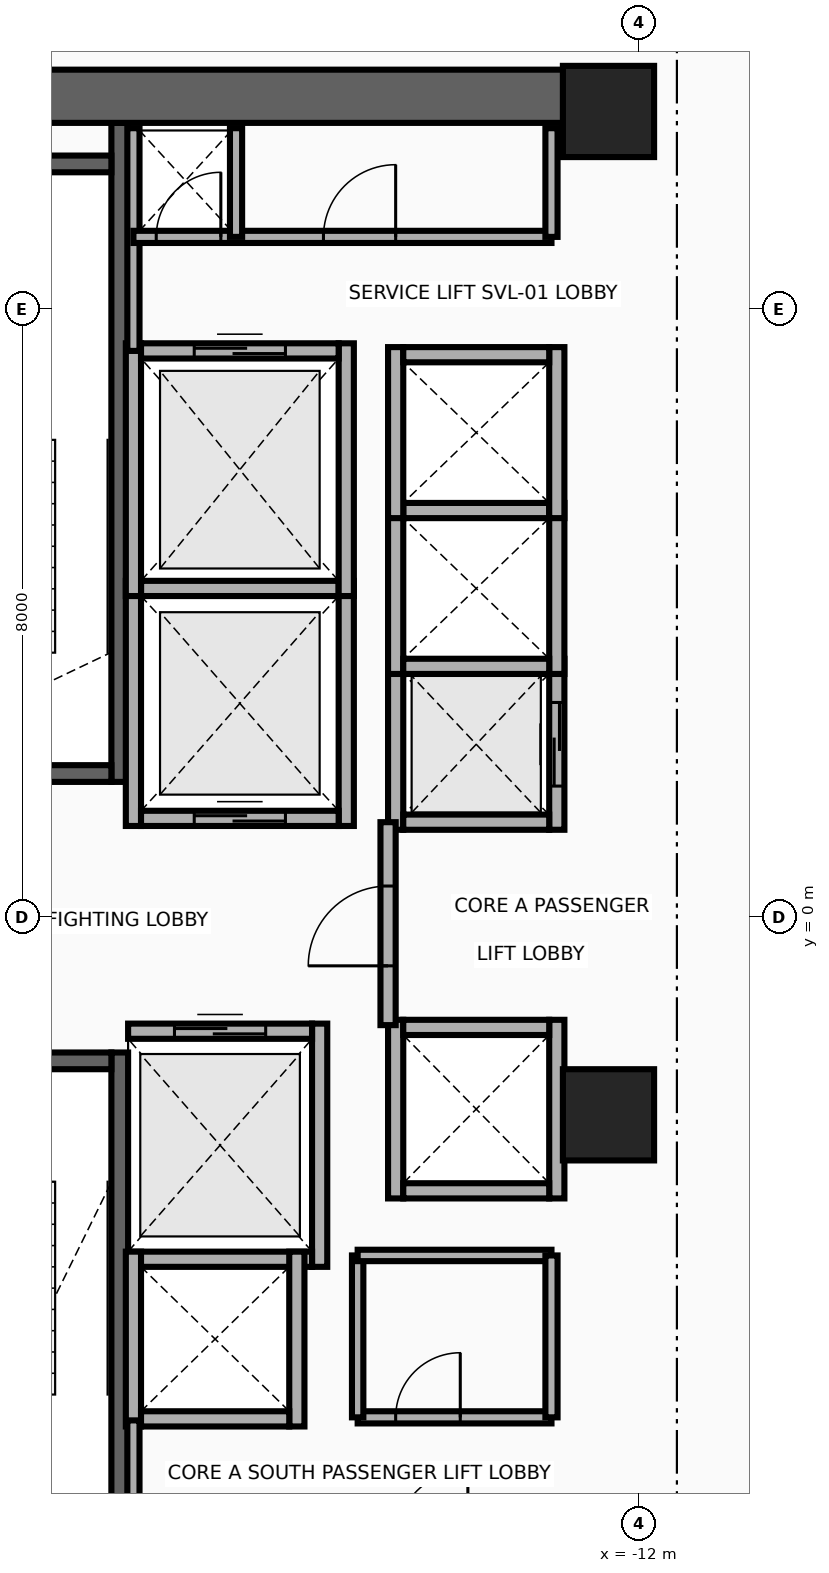
"""IFC4 building model, lengths in metres.
Left out: names, types, materials, properties, quantities, classifications, styles, units other than length and angle.
Written with IfcOpenShell. Run it as: python <this file> out.ifc"""

import sys

from ifc_helpers import new_model, si_unit, direction, frame, frame_2d, origin, origin_2d, place, context, subcontext, project, spatial, rectangle, extrude, source, transform, mapped, element, fill, save


model = new_model("IFC4")
c1 = context("Model", 3, precision=1e-05, world=origin(), true_north=direction((0.0, 1.0)))
c2 = subcontext(c1, "Body", "Model", "MODEL_VIEW")
j1 = project(units=[si_unit("LENGTHUNIT", "METRE"), si_unit("PLANEANGLEUNIT", "RADIAN")], contexts=[c1])
p1 = place(None, origin())
s1 = spatial("IfcSite", under=j1, at=p1, CompositionType="ELEMENT")
p2 = place(p1, origin())
s2 = spatial("IfcBuilding", under=s1, at=p2, CompositionType="ELEMENT")
p3 = place(p2, frame((0.0, 0.0, 113.1)))
s3 = spatial("IfcBuildingStorey", under=s2, at=p3, CompositionType="ELEMENT", Elevation=113.1)
p4 = place(p3, frame((-18.83, 1.78, 0.0), z_axis=(0.0, 0.0, 1.0), x_axis=(0.0, 1.0, 0.0)))
e1 = element("IfcWall", 1, at=p4, inside=s3, PredefinedType="SHEAR", context=c2, shape_type="SweptSolid", body=[
    extrude(rectangle(XDim=8.67, YDim=0.22, at=frame_2d((4.335, 0.0))), origin(), (0.0, 0.0, 1.0), 3.46),
])
p5 = place(p3, frame((-22.05, 1.89, 0.0), z_axis=(0.0, 0.0, 1.0), x_axis=(1.0, 0.0, 0.0)))
e2 = element("IfcWall", 2, at=p5, inside=s3, PredefinedType="SHEAR", context=c2, shape_type="SweptSolid", body=[
    extrude(rectangle(XDim=3.11, YDim=0.22, at=frame_2d((1.555, 0.0))), origin(), (0.0, 0.0, 1.0), 3.46),
])
p6 = place(p5, frame((1.0, 0.0, 0.0)))
e3 = element("IfcOpeningElement", 3, at=p6, cuts=e2, PredefinedType="OPENING", context=c2, shape_type="SweptSolid", body=[
    extrude(rectangle(XDim=1.1, YDim=2.15, at=frame_2d((0.55, 1.075))), frame((0.0, 0.125, 0.0), z_axis=(0.0, -1.0, 0.0), x_axis=(1.0, 0.0, 0.0)), (0.0, 0.0, 1.0), 0.25),
])
p7 = place(p3, frame((-22.05, 9.91, 0.0), z_axis=(0.0, 0.0, 1.0), x_axis=(1.0, 0.0, 0.0)))
e4 = element("IfcWall", 4, at=p7, inside=s3, PredefinedType="SHEAR", context=c2, shape_type="SweptSolid", body=[
    extrude(rectangle(XDim=3.11, YDim=0.22, at=frame_2d((1.555, 0.0))), origin(), (0.0, 0.0, 1.0), 3.46),
])
p8 = place(p3, frame((-18.83, -10.45, 0.0), z_axis=(0.0, 0.0, 1.0), x_axis=(0.0, 1.0, 0.0)))
e5 = element("IfcWall", 5, at=p8, inside=s3, PredefinedType="SHEAR", context=c2, shape_type="SweptSolid", body=[
    extrude(rectangle(XDim=8.67, YDim=0.22, at=frame_2d((4.335, 0.0))), origin(), (0.0, 0.0, 1.0), 3.46),
])
p9 = place(p3, frame((-22.05, -1.89, 0.0), z_axis=(0.0, 0.0, 1.0), x_axis=(1.0, 0.0, 0.0)))
e6 = element("IfcWall", 6, at=p9, inside=s3, PredefinedType="SHEAR", context=c2, shape_type="SweptSolid", body=[
    extrude(rectangle(XDim=3.11, YDim=0.22, at=frame_2d((1.555, 0.0))), origin(), (0.0, 0.0, 1.0), 3.46),
])
p10 = place(p9, frame((1.0, 0.0, 0.0)))
e7 = element("IfcOpeningElement", 7, at=p10, cuts=e6, PredefinedType="OPENING", context=c2, shape_type="SweptSolid", body=[
    extrude(rectangle(XDim=1.1, YDim=2.15, at=frame_2d((0.55, 1.075))), frame((0.0, 0.125, 0.0), z_axis=(0.0, -1.0, 0.0), x_axis=(1.0, 0.0, 0.0)), (0.0, 0.0, 1.0), 0.25),
])
p11 = place(p3, frame((-22.65, 10.8, 0.0), z_axis=(0.0, 0.0, 1.0), x_axis=(1.0, 0.0, 0.0)))
e8 = element("IfcWall", 8, at=p11, inside=s3, PredefinedType="SHEAR", context=c2, shape_type="SweptSolid", body=[
    extrude(rectangle(XDim=10.25, YDim=0.7, at=frame_2d((5.125, 0.0))), origin(), (0.0, 0.0, 1.0), 3.46),
])
m1 = source(origin(), c2, "Body", "SweptSolid", [
    extrude(rectangle(XDim=1.2, YDim=1.2, at=origin_2d()), origin(), (0.0, 0.0, 1.0), 3.7),
])
for number, where, z_axis, x_axis in (
    (9, (-12.4, -2.6, 0.0), (0.0, 0.0, 1.0), (1.0, 0.0, 0.0)),
    (10, (-12.4, 10.6, 0.0), (0.0, 0.0, 1.0), (1.0, 0.0, 0.0)),
):
    element("IfcColumn", number, at=place(p3, frame(where, z_axis=z_axis, x_axis=x_axis)), inside=s3, PredefinedType="COLUMN", context=c2, shape_type="MappedRepresentation", body=[
        mapped(m1, transform((0.0, 0.0, 0.0), x_axis=(1.0, 0.0, 0.0), y_axis=(0.0, 1.0, 0.0), z_axis=(0.0, 0.0, 1.0), scale=1.0)),
    ])
for number, where, z_axis, x_axis in (
    (11, (-18.65, 1.2, 0.0), (0.0, 0.0, 1.0), (0.0, 1.0, 0.0)),
    (12, (-15.85, 1.2, 0.0), (0.0, 0.0, 1.0), (0.0, 1.0, 0.0)),
):
    element("IfcWall", number, at=place(p3, frame(where, z_axis=z_axis, x_axis=x_axis)), inside=s3, PredefinedType="MOVABLE", context=c2, shape_type="SweptSolid", body=[
        extrude(rectangle(XDim=3.225, YDim=0.2, at=frame_2d((1.613, 0.0))), origin(), (0.0, 0.0, 1.0), 3.46),
    ])
p12 = place(p3, frame((-18.55, 1.3, 0.0), z_axis=(0.0, 0.0, 1.0), x_axis=(1.0, 0.0, 0.0)))
e13 = element("IfcWall", 13, at=p12, inside=s3, PredefinedType="MOVABLE", context=c2, shape_type="SweptSolid", body=[
    extrude(rectangle(XDim=2.6, YDim=0.2, at=frame_2d((1.3, 0.0))), origin(), (0.0, 0.0, 1.0), 3.46),
])
p13 = place(p12, frame((0.7, 0.0, 0.0)))
e14 = element("IfcOpeningElement", 14, at=p13, cuts=e13, PredefinedType="OPENING", context=c2, shape_type="SweptSolid", body=[
    extrude(rectangle(XDim=1.2, YDim=2.1, at=frame_2d((0.6, 1.05))), frame((0.0, 0.115, 0.0), z_axis=(0.0, -1.0, 0.0), x_axis=(1.0, 0.0, 0.0)), (0.0, 0.0, 1.0), 0.23),
])
p14 = place(p3, frame((-18.55, 4.325, 0.0), z_axis=(0.0, 0.0, 1.0), x_axis=(1.0, 0.0, 0.0)))
e15 = element("IfcWall", 15, at=p14, inside=s3, PredefinedType="MOVABLE", context=c2, shape_type="SweptSolid", body=[
    extrude(rectangle(XDim=2.6, YDim=0.2, at=frame_2d((1.3, 0.0))), origin(), (0.0, 0.0, 1.0), 3.46),
])
p15 = place(p3, frame((-16.2, -4.6, 0.0), z_axis=(0.0, 0.0, 1.0), x_axis=(0.0, 1.0, 0.0)))
e16 = element("IfcWall", 16, at=p15, inside=s3, PredefinedType="MOVABLE", context=c2, shape_type="SweptSolid", body=[
    extrude(rectangle(XDim=3.2, YDim=0.2, at=frame_2d((1.6, 0.0))), origin(), (0.0, 0.0, 1.0), 3.46),
])
p16 = place(p3, frame((-18.72, -4.5, 0.0), z_axis=(0.0, 0.0, 1.0), x_axis=(1.0, 0.0, 0.0)))
e17 = element("IfcWall", 17, at=p16, inside=s3, PredefinedType="MOVABLE", context=c2, shape_type="SweptSolid", body=[
    extrude(rectangle(XDim=2.42, YDim=0.2, at=frame_2d((1.21, 0.0))), origin(), (0.0, 0.0, 1.0), 3.46),
])
p17 = place(p3, frame((-18.72, -1.5, 0.0), z_axis=(0.0, 0.0, 1.0), x_axis=(1.0, 0.0, 0.0)))
e18 = element("IfcWall", 18, at=p17, inside=s3, PredefinedType="MOVABLE", context=c2, shape_type="SweptSolid", body=[
    extrude(rectangle(XDim=2.42, YDim=0.2, at=frame_2d((1.21, 0.0))), origin(), (0.0, 0.0, 1.0), 3.46),
])
p18 = place(p17, frame((0.61, 0.0, 0.0)))
e19 = element("IfcOpeningElement", 19, at=p18, cuts=e18, PredefinedType="OPENING", context=c2, shape_type="SweptSolid", body=[
    extrude(rectangle(XDim=1.2, YDim=2.1, at=frame_2d((0.6, 1.05))), frame((0.0, 0.115, 0.0), z_axis=(0.0, -1.0, 0.0), x_axis=(1.0, 0.0, 0.0)), (0.0, 0.0, 1.0), 0.23),
])
for number, where, z_axis, x_axis in (
    (20, (-18.65, 4.225, 0.0), (0.0, 0.0, 1.0), (0.0, 1.0, 0.0)),
    (21, (-15.85, 4.225, 0.0), (0.0, 0.0, 1.0), (0.0, 1.0, 0.0)),
):
    element("IfcWall", number, at=place(p3, frame(where, z_axis=z_axis, x_axis=x_axis)), inside=s3, PredefinedType="MOVABLE", context=c2, shape_type="SweptSolid", body=[
        extrude(rectangle(XDim=3.325, YDim=0.2, at=frame_2d((1.663, 0.0))), origin(), (0.0, 0.0, 1.0), 3.46),
    ])
p19 = place(p3, frame((-18.55, 7.45, 0.0), z_axis=(0.0, 0.0, 1.0), x_axis=(1.0, 0.0, 0.0)))
e22 = element("IfcWall", 22, at=p19, inside=s3, PredefinedType="MOVABLE", context=c2, shape_type="SweptSolid", body=[
    extrude(rectangle(XDim=2.6, YDim=0.2, at=frame_2d((1.3, 0.0))), origin(), (0.0, 0.0, 1.0), 3.46),
])
p20 = place(p19, frame((0.7, 0.0, 0.0)))
e23 = element("IfcOpeningElement", 23, at=p20, cuts=e22, PredefinedType="OPENING", context=c2, shape_type="SweptSolid", body=[
    extrude(rectangle(XDim=1.2, YDim=2.1, at=frame_2d((0.6, 1.05))), frame((0.0, 0.115, 0.0), z_axis=(0.0, -1.0, 0.0), x_axis=(1.0, 0.0, 0.0)), (0.0, 0.0, 1.0), 0.23),
])
p21 = place(p3, frame((-15.2, 1.15, 0.0), z_axis=(0.0, 0.0, 1.0), x_axis=(0.0, 1.0, 0.0)))
e24 = element("IfcWall", 24, at=p21, inside=s3, PredefinedType="MOVABLE", context=c2, shape_type="SweptSolid", body=[
    extrude(rectangle(XDim=2.25, YDim=0.2, at=frame_2d((1.125, 0.0))), origin(), (0.0, 0.0, 1.0), 3.46),
])
p22 = place(p3, frame((-13.08, 1.15, 0.0), z_axis=(0.0, 0.0, 1.0), x_axis=(0.0, 1.0, 0.0)))
e25 = element("IfcWall", 25, at=p22, inside=s3, PredefinedType="MOVABLE", context=c2, shape_type="SweptSolid", body=[
    extrude(rectangle(XDim=2.25, YDim=0.2, at=frame_2d((1.125, 0.0))), origin(), (0.0, 0.0, 1.0), 3.46),
])
p23 = place(p22, frame((0.575, 0.0, 0.0)))
e26 = element("IfcOpeningElement", 26, at=p23, cuts=e25, PredefinedType="OPENING", context=c2, shape_type="SweptSolid", body=[
    extrude(rectangle(XDim=1.1, YDim=2.1, at=frame_2d((0.55, 1.05))), frame((0.0, 0.115, 0.0), z_axis=(0.0, -1.0, 0.0), x_axis=(1.0, 0.0, 0.0)), (0.0, 0.0, 1.0), 0.23),
])
p24 = place(p3, frame((-15.1, 1.25, 0.0), z_axis=(0.0, 0.0, 1.0), x_axis=(1.0, 0.0, 0.0)))
e27 = element("IfcWall", 27, at=p24, inside=s3, PredefinedType="MOVABLE", context=c2, shape_type="SweptSolid", body=[
    extrude(rectangle(XDim=1.92, YDim=0.2, at=frame_2d((0.96, 0.0))), origin(), (0.0, 0.0, 1.0), 3.46),
])
for number, where, z_axis, x_axis in (
    (28, (-15.2, 3.2, 0.0), (0.0, 0.0, 1.0), (0.0, 1.0, 0.0)),
    (29, (-13.08, 3.2, 0.0), (0.0, 0.0, 1.0), (0.0, 1.0, 0.0)),
):
    element("IfcWall", number, at=place(p3, frame(where, z_axis=z_axis, x_axis=x_axis)), inside=s3, PredefinedType="MOVABLE", context=c2, shape_type="SweptSolid", body=[
        extrude(rectangle(XDim=2.25, YDim=0.2, at=frame_2d((1.125, 0.0))), origin(), (0.0, 0.0, 1.0), 3.46),
    ])
for number, where, z_axis, x_axis in (
    (30, (-15.1, 3.3, 0.0), (0.0, 0.0, 1.0), (1.0, 0.0, 0.0)),
    (31, (-15.1, 5.35, 0.0), (0.0, 0.0, 1.0), (1.0, 0.0, 0.0)),
):
    element("IfcWall", number, at=place(p3, frame(where, z_axis=z_axis, x_axis=x_axis)), inside=s3, PredefinedType="MOVABLE", context=c2, shape_type="SweptSolid", body=[
        extrude(rectangle(XDim=1.92, YDim=0.2, at=frame_2d((0.96, 0.0))), origin(), (0.0, 0.0, 1.0), 3.46),
    ])
for number, where, z_axis, x_axis in (
    (32, (-15.2, 5.25, 0.0), (0.0, 0.0, 1.0), (0.0, 1.0, 0.0)),
    (33, (-13.08, 5.25, 0.0), (0.0, 0.0, 1.0), (0.0, 1.0, 0.0)),
):
    element("IfcWall", number, at=place(p3, frame(where, z_axis=z_axis, x_axis=x_axis)), inside=s3, PredefinedType="MOVABLE", context=c2, shape_type="SweptSolid", body=[
        extrude(rectangle(XDim=2.25, YDim=0.2, at=frame_2d((1.125, 0.0))), origin(), (0.0, 0.0, 1.0), 3.46),
    ])
p25 = place(p3, frame((-15.1, 7.4, 0.0), z_axis=(0.0, 0.0, 1.0), x_axis=(1.0, 0.0, 0.0)))
e34 = element("IfcWall", 34, at=p25, inside=s3, PredefinedType="MOVABLE", context=c2, shape_type="SweptSolid", body=[
    extrude(rectangle(XDim=1.92, YDim=0.2, at=frame_2d((0.96, 0.0))), origin(), (0.0, 0.0, 1.0), 3.46),
])
for number, where, z_axis, x_axis in (
    (35, (-18.65, -6.7, 0.0), (0.0, 0.0, 1.0), (0.0, 1.0, 0.0)),
    (36, (-16.5, -6.7, 0.0), (0.0, 0.0, 1.0), (0.0, 1.0, 0.0)),
):
    element("IfcWall", number, at=place(p3, frame(where, z_axis=z_axis, x_axis=x_axis)), inside=s3, PredefinedType="MOVABLE", context=c2, shape_type="SweptSolid", body=[
        extrude(rectangle(XDim=2.3, YDim=0.2, at=frame_2d((1.15, 0.0))), origin(), (0.0, 0.0, 1.0), 3.46),
    ])
p26 = place(p3, frame((-18.55, -6.6, 0.0), z_axis=(0.0, 0.0, 1.0), x_axis=(1.0, 0.0, 0.0)))
e37 = element("IfcWall", 37, at=p26, inside=s3, PredefinedType="MOVABLE", context=c2, shape_type="SweptSolid", body=[
    extrude(rectangle(XDim=1.95, YDim=0.2, at=frame_2d((0.975, 0.0))), origin(), (0.0, 0.0, 1.0), 3.46),
])
for number, where, z_axis, x_axis in (
    (38, (-15.2, -3.7, 0.0), (0.0, 0.0, 1.0), (0.0, 1.0, 0.0)),
    (39, (-13.08, -3.7, 0.0), (0.0, 0.0, 1.0), (0.0, 1.0, 0.0)),
):
    element("IfcWall", number, at=place(p3, frame(where, z_axis=z_axis, x_axis=x_axis)), inside=s3, PredefinedType="MOVABLE", context=c2, shape_type="SweptSolid", body=[
        extrude(rectangle(XDim=2.35, YDim=0.2, at=frame_2d((1.175, 0.0))), origin(), (0.0, 0.0, 1.0), 3.46),
    ])
for number, where, z_axis, x_axis in (
    (40, (-15.1, -3.6, 0.0), (0.0, 0.0, 1.0), (1.0, 0.0, 0.0)),
    (41, (-15.1, -1.45, 0.0), (0.0, 0.0, 1.0), (1.0, 0.0, 0.0)),
):
    element("IfcWall", number, at=place(p3, frame(where, z_axis=z_axis, x_axis=x_axis)), inside=s3, PredefinedType="MOVABLE", context=c2, shape_type="SweptSolid", body=[
        extrude(rectangle(XDim=1.92, YDim=0.2, at=frame_2d((0.96, 0.0))), origin(), (0.0, 0.0, 1.0), 3.46),
    ])
p27 = place(p3, frame((-15.3, -1.42, 0.0), z_axis=(0.0, 0.0, 1.0), x_axis=(0.0, 1.0, 0.0)))
e42 = element("IfcWall", 42, at=p27, inside=s3, PredefinedType="PARTITIONING", context=c2, shape_type="SweptSolid", body=[
    extrude(rectangle(XDim=2.67, YDim=0.2, at=frame_2d((1.335, 0.0))), origin(), (0.0, 0.0, 1.0), 3.46),
])
p28 = place(p27, frame((0.78, 0.0, 0.0)))
e43 = element("IfcOpeningElement", 43, at=p28, cuts=e42, PredefinedType="OPENING", context=c2, shape_type="SweptSolid", body=[
    extrude(rectangle(XDim=1.05, YDim=2.15, at=frame_2d((0.525, 1.075))), frame((0.0, 0.115, 0.0), z_axis=(0.0, -1.0, 0.0), x_axis=(1.0, 0.0, 0.0)), (0.0, 0.0, 1.0), 0.23),
])
p29 = place(p3, frame((-18.65, 7.45, 0.0), z_axis=(0.0, 0.0, 1.0), x_axis=(0.0, 1.0, 0.0)))
e44 = element("IfcWall", 44, at=p29, inside=s3, PredefinedType="PARTITIONING", context=c2, shape_type="SweptSolid", body=[
    extrude(rectangle(XDim=2.93, YDim=0.16, at=frame_2d((1.465, 0.0))), origin(), (0.0, 0.0, 1.0), 3.46),
])
p30 = place(p3, frame((-18.65, -8.18, 0.0), z_axis=(0.0, 0.0, 1.0), x_axis=(0.0, 1.0, 0.0)))
e45 = element("IfcWall", 45, at=p30, inside=s3, PredefinedType="PARTITIONING", context=c2, shape_type="SweptSolid", body=[
    extrude(rectangle(XDim=1.56, YDim=0.16, at=frame_2d((0.78, 0.0))), origin(), (0.0, 0.0, 1.0), 3.46),
])
p31 = place(p3, frame((-18.65, 8.95, 0.0), z_axis=(0.0, 0.0, 1.0), x_axis=(1.0, 0.0, 0.0)))
e46 = element("IfcWall", 46, at=p31, inside=s3, PredefinedType="PARTITIONING", context=c2, shape_type="SweptSolid", body=[
    extrude(rectangle(XDim=5.5, YDim=0.16, at=frame_2d((2.75, 0.0))), origin(), (0.0, 0.0, 1.0), 3.46),
])
p32 = place(p31, frame((0.3, 0.0, 0.0)))
e47 = element("IfcOpeningElement", 47, at=p32, cuts=e46, PredefinedType="OPENING", context=c2, shape_type="SweptSolid", body=[
    extrude(rectangle(XDim=0.85, YDim=2.05, at=frame_2d((0.425, 1.025))), frame((0.0, 0.095, 0.0), z_axis=(0.0, -1.0, 0.0), x_axis=(1.0, 0.0, 0.0)), (0.0, 0.0, 1.0), 0.19),
])
p33 = place(p31, frame((2.5, 0.0, 0.0)))
e48 = element("IfcOpeningElement", 48, at=p33, cuts=e46, PredefinedType="OPENING", context=c2, shape_type="SweptSolid", body=[
    extrude(rectangle(XDim=0.95, YDim=2.15, at=frame_2d((0.475, 1.075))), frame((0.0, 0.095, 0.0), z_axis=(0.0, -1.0, 0.0), x_axis=(1.0, 0.0, 0.0)), (0.0, 0.0, 1.0), 0.19),
])
for number, where, z_axis, x_axis in (
    (49, (-13.15, 8.95, 0.0), (0.0, 0.0, 1.0), (0.0, 1.0, 0.0)),
    (50, (-17.3, 8.95, 0.0), (0.0, 0.0, 1.0), (0.0, 1.0, 0.0)),
):
    element("IfcWall", number, at=place(p3, frame(where, z_axis=z_axis, x_axis=x_axis)), inside=s3, PredefinedType="PARTITIONING", context=c2, shape_type="SweptSolid", body=[
        extrude(rectangle(XDim=1.43, YDim=0.16, at=frame_2d((0.715, 0.0))), origin(), (0.0, 0.0, 1.0), 3.46),
    ])
p34 = place(p3, frame((-15.7, -6.58, 0.0), z_axis=(0.0, 0.0, 1.0), x_axis=(1.0, 0.0, 0.0)))
e51 = element("IfcWall", 51, at=p34, inside=s3, PredefinedType="PARTITIONING", context=c2, shape_type="SweptSolid", body=[
    extrude(rectangle(XDim=2.55, YDim=0.16, at=frame_2d((1.275, 0.0))), origin(), (0.0, 0.0, 1.0), 3.46),
])
p35 = place(p34, frame((0.5, 0.0, 0.0)))
e52 = element("IfcOpeningElement", 52, at=p35, cuts=e51, PredefinedType="OPENING", context=c2, shape_type="SweptSolid", body=[
    extrude(rectangle(XDim=0.85, YDim=2.05, at=frame_2d((0.425, 1.025))), frame((0.0, 0.095, 0.0), z_axis=(0.0, -1.0, 0.0), x_axis=(1.0, 0.0, 0.0)), (0.0, 0.0, 1.0), 0.19),
])
p36 = place(p3, frame((-15.7, -6.58, 0.0), z_axis=(0.0, 0.0, 1.0), x_axis=(0.0, 1.0, 0.0)))
e53 = element("IfcWall", 53, at=p36, inside=s3, PredefinedType="PARTITIONING", context=c2, shape_type="SweptSolid", body=[
    extrude(rectangle(XDim=2.13, YDim=0.15, at=frame_2d((1.065, 0.0))), origin(), (0.0, 0.0, 1.0), 3.46),
])
p37 = place(p3, frame((-15.7, -4.45, 0.0), z_axis=(0.0, 0.0, 1.0), x_axis=(1.0, 0.0, 0.0)))
e54 = element("IfcWall", 54, at=p37, inside=s3, PredefinedType="PARTITIONING", context=c2, shape_type="SweptSolid", body=[
    extrude(rectangle(XDim=2.55, YDim=0.15, at=frame_2d((1.275, 0.0))), origin(), (0.0, 0.0, 1.0), 3.46),
])
p38 = place(p3, frame((-13.15, -6.58, 0.0), z_axis=(0.0, 0.0, 1.0), x_axis=(0.0, 1.0, 0.0)))
e55 = element("IfcWall", 55, at=p38, inside=s3, PredefinedType="PARTITIONING", context=c2, shape_type="SweptSolid", body=[
    extrude(rectangle(XDim=2.13, YDim=0.16, at=frame_2d((1.065, 0.0))), origin(), (0.0, 0.0, 1.0), 3.46),
])
p39 = place(p13, origin())
e56 = element("IfcDoor", 56, at=p39, inside=s3, OperationType="DOUBLE_DOOR_SLIDING", PredefinedType="DOOR", context=c2, shape_type="SweptSolid", body=[
    extrude(rectangle(XDim=1.2, YDim=2.1, at=frame_2d((0.6, 1.05))), frame((0.0, 0.025, 0.0), z_axis=(0.0, -1.0, 0.0), x_axis=(1.0, 0.0, 0.0)), (0.0, 0.0, 1.0), 0.05),
])
fill(e14, e56)
p40 = place(p18, origin())
e57 = element("IfcDoor", 57, at=p40, inside=s3, OperationType="DOUBLE_DOOR_SLIDING", PredefinedType="DOOR", context=c2, shape_type="SweptSolid", body=[
    extrude(rectangle(XDim=1.2, YDim=2.1, at=frame_2d((0.6, 1.05))), frame((0.0, 0.025, 0.0), z_axis=(0.0, -1.0, 0.0), x_axis=(1.0, 0.0, 0.0)), (0.0, 0.0, 1.0), 0.05),
])
fill(e19, e57)
p41 = place(p20, origin())
e58 = element("IfcDoor", 58, at=p41, inside=s3, OperationType="DOUBLE_DOOR_SLIDING", PredefinedType="DOOR", context=c2, shape_type="SweptSolid", body=[
    extrude(rectangle(XDim=1.2, YDim=2.1, at=frame_2d((0.6, 1.05))), frame((0.0, 0.025, 0.0), z_axis=(0.0, -1.0, 0.0), x_axis=(1.0, 0.0, 0.0)), (0.0, 0.0, 1.0), 0.05),
])
fill(e23, e58)
p42 = place(p23, origin())
e59 = element("IfcDoor", 59, at=p42, inside=s3, OperationType="DOUBLE_DOOR_SLIDING", PredefinedType="DOOR", context=c2, shape_type="SweptSolid", body=[
    extrude(rectangle(XDim=1.1, YDim=2.1, at=frame_2d((0.55, 1.05))), frame((0.0, 0.025, 0.0), z_axis=(0.0, -1.0, 0.0), x_axis=(1.0, 0.0, 0.0)), (0.0, 0.0, 1.0), 0.05),
])
fill(e26, e59)
p43 = place(p28, origin())
e60 = element("IfcDoor", 60, at=p43, inside=s3, OperationType="SINGLE_SWING_RIGHT", PredefinedType="DOOR", context=c2, shape_type="SweptSolid", body=[
    extrude(rectangle(XDim=1.05, YDim=2.15, at=frame_2d((0.525, 1.075))), frame((0.0, 0.025, 0.0), z_axis=(0.0, -1.0, 0.0), x_axis=(1.0, 0.0, 0.0)), (0.0, 0.0, 1.0), 0.05),
])
fill(e43, e60)
p44 = place(p32, origin())
e61 = element("IfcDoor", 61, at=p44, inside=s3, OperationType="SINGLE_SWING_LEFT", PredefinedType="DOOR", context=c2, shape_type="SweptSolid", body=[
    extrude(rectangle(XDim=0.85, YDim=2.05, at=frame_2d((0.425, 1.025))), frame((0.0, 0.025, 0.0), z_axis=(0.0, -1.0, 0.0), x_axis=(1.0, 0.0, 0.0)), (0.0, 0.0, 1.0), 0.05),
])
fill(e47, e61)
p45 = place(p33, origin())
e62 = element("IfcDoor", 62, at=p45, inside=s3, OperationType="SINGLE_SWING_RIGHT", PredefinedType="DOOR", context=c2, shape_type="SweptSolid", body=[
    extrude(rectangle(XDim=0.95, YDim=2.15, at=frame_2d((0.475, 1.075))), frame((0.0, 0.025, 0.0), z_axis=(0.0, -1.0, 0.0), x_axis=(1.0, 0.0, 0.0)), (0.0, 0.0, 1.0), 0.05),
])
fill(e48, e62)
p46 = place(p35, origin())
e63 = element("IfcDoor", 63, at=p46, inside=s3, OperationType="SINGLE_SWING_RIGHT", PredefinedType="DOOR", context=c2, shape_type="SweptSolid", body=[
    extrude(rectangle(XDim=0.85, YDim=2.05, at=frame_2d((0.425, 1.025))), frame((0.0, 0.025, 0.0), z_axis=(0.0, -1.0, 0.0), x_axis=(1.0, 0.0, 0.0)), (0.0, 0.0, 1.0), 0.05),
])
fill(e52, e63)
save(model, sys.argv[1])
